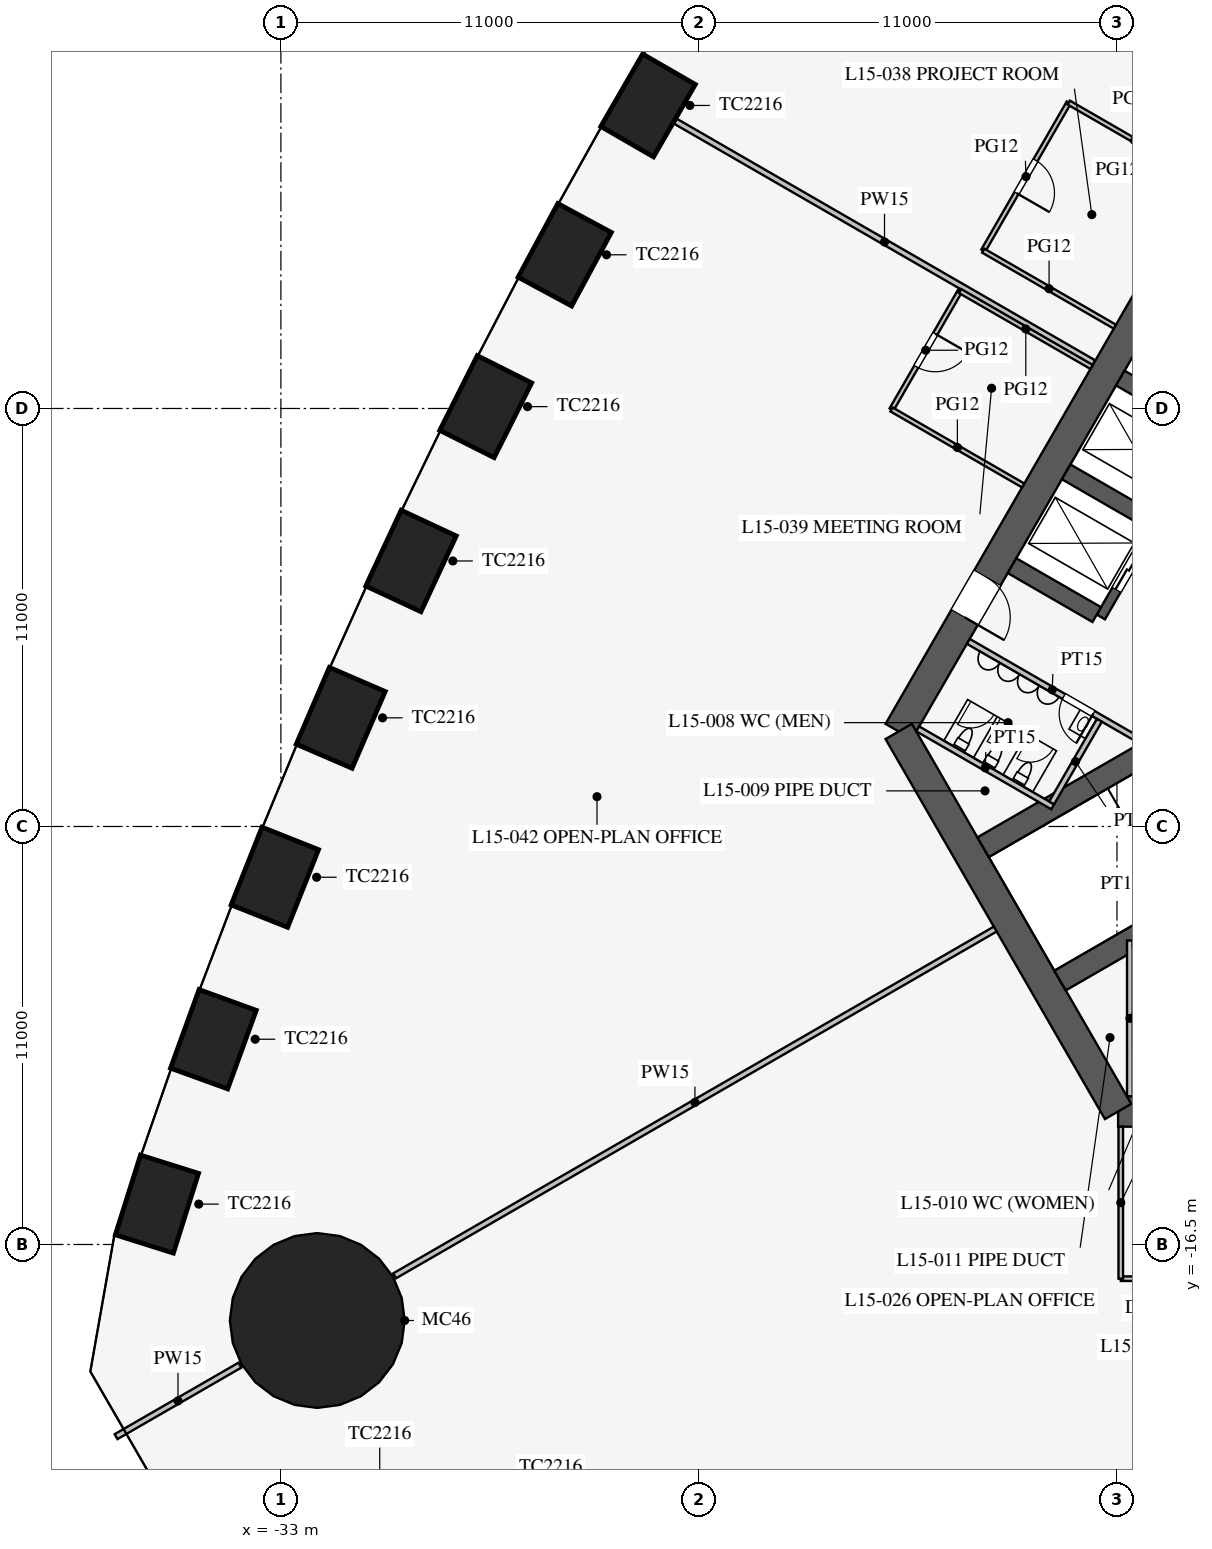
"""IFC4 building model, lengths in metres.
Left out: names, types, materials, properties, quantities, classifications, styles, units other than length and angle.
Written with IfcOpenShell. Run it as: python <this file> out.ifc"""

import sys

from ifc_helpers import new_model, si_unit, direction, frame, frame_2d, origin, origin_2d, place, context, subcontext, project, spatial, rectangle, circle, extrude, element, fill, save


model = new_model("IFC4")
c1 = context("Model", 3, precision=1e-05, world=origin(), true_north=direction((0.0, 1.0)))
c2 = subcontext(c1, "Body", "Model", "MODEL_VIEW")
j1 = project(units=[si_unit("LENGTHUNIT", "METRE"), si_unit("PLANEANGLEUNIT", "RADIAN")], contexts=[c1])
p1 = place(None, origin())
s1 = spatial("IfcSite", under=j1, at=p1, CompositionType="ELEMENT")
p2 = place(p1, origin())
s2 = spatial("IfcBuilding", under=s1, at=p2, CompositionType="ELEMENT")
p3 = place(p2, frame((0.0, 0.0, 66.9)))
s3 = spatial("IfcBuildingStorey", under=s2, at=p3, CompositionType="ELEMENT", Elevation=66.9)
for number, where, z_axis, x_axis in (
    (1, (-23.338, 13.474, 0.0), (0.0, 0.0, 1.0), (-0.5, -0.866, 0.0)),
    (2, (-25.531, 9.544, 0.0), (0.0, 0.0, 1.0), (-0.475, -0.88, 0.0)),
    (3, (-27.611, 5.549, 0.0), (0.0, 0.0, 1.0), (-0.449, -0.894, 0.0)),
    (4, (-29.576, 1.487, 0.0), (0.0, 0.0, 1.0), (-0.423, -0.906, 0.0)),
    (5, (-31.426, -2.641, 0.0), (0.0, 0.0, 1.0), (-0.396, -0.918, 0.0)),
    (6, (-33.16, -6.836, 0.0), (0.0, 0.0, 1.0), (-0.369, -0.929, 0.0)),
    (7, (-34.776, -11.099, 0.0), (0.0, 0.0, 1.0), (-0.342, -0.94, 0.0)),
    (8, (-36.262, -15.438, 0.0), (0.0, 0.0, 1.0), (-0.3, -0.954, 0.0)),
):
    element("IfcColumn", number, at=place(p3, frame(where, z_axis=z_axis, x_axis=x_axis)), inside=s3, PredefinedType="COLUMN", context=c2, shape_type="SweptSolid", body=[
        extrude(rectangle(XDim=2.2, YDim=1.6, at=origin_2d()), origin(), (0.0, 0.0, 1.0), 4.2),
    ])
p4 = place(p3, frame((-32.043, -18.5, 0.0), z_axis=(0.0, 0.0, 1.0), x_axis=(1.0, 0.0, 0.0)))
e9 = element("IfcColumn", 9, at=p4, inside=s3, PredefinedType="COLUMN", context=c2, shape_type="SweptSolid", body=[
    extrude(circle(Radius=2.3, at=origin_2d()), origin(), (0.0, 0.0, 1.0), 4.2),
])
p5 = place(p3, frame((-10.97, -13.0, 0.0), z_axis=(0.0, 0.0, 1.0), x_axis=(1.0, 0.0, 0.0)))
e10 = element("IfcWall", 10, at=p5, inside=s3, PredefinedType="SHEAR", context=c2, shape_type="SweptSolid", body=[
    extrude(rectangle(XDim=21.939, YDim=0.8, at=frame_2d((10.97, 0.0))), origin(), (0.0, 0.0, 1.0), 4.2),
])
p6 = place(p5, frame((17.27, 0.0, 0.0)))
e11 = element("IfcOpeningElement", 11, at=p6, cuts=e10, PredefinedType="OPENING", context=c2, shape_type="SweptSolid", body=[
    extrude(rectangle(XDim=1.2, YDim=2.1, at=frame_2d((0.6, 1.05))), frame((0.0, 0.41, 0.0), z_axis=(0.0, -1.0, 0.0), x_axis=(1.0, 0.0, 0.0)), (0.0, 0.0, 1.0), 0.82),
])
p7 = place(p5, frame((3.47, 0.0, 0.0)))
e12 = element("IfcOpeningElement", 12, at=p7, cuts=e10, PredefinedType="OPENING", context=c2, shape_type="SweptSolid", body=[
    extrude(rectangle(XDim=1.2, YDim=2.1, at=frame_2d((0.6, 1.05))), frame((0.0, 0.41, 0.0), z_axis=(0.0, -1.0, 0.0), x_axis=(1.0, 0.0, 0.0)), (0.0, 0.0, 1.0), 0.82),
])
p8 = place(p3, frame((-5.773, 16.0, 0.0), z_axis=(0.0, 0.0, 1.0), x_axis=(-0.500002442456, -0.866023993627, 0.0)))
e13 = element("IfcWall", 13, at=p8, inside=s3, PredefinedType="SHEAR", context=c2, shape_type="SweptSolid", body=[
    extrude(rectangle(XDim=21.939, YDim=0.8, at=frame_2d((10.97, 0.0))), origin(), (0.0, 0.0, 1.0), 4.2),
])
p9 = place(p8, frame((17.27, 0.0, 0.0)))
e14 = element("IfcOpeningElement", 14, at=p9, cuts=e13, PredefinedType="OPENING", context=c2, shape_type="SweptSolid", body=[
    extrude(rectangle(XDim=1.2, YDim=2.1, at=frame_2d((0.6, 1.05))), frame((0.0, 0.41, 0.0), z_axis=(0.0, -1.0, 0.0), x_axis=(1.0, 0.0, 0.0)), (0.0, 0.0, 1.0), 0.82),
])
p10 = place(p8, frame((3.47, 0.0, 0.0)))
e15 = element("IfcOpeningElement", 15, at=p10, cuts=e13, PredefinedType="OPENING", context=c2, shape_type="SweptSolid", body=[
    extrude(rectangle(XDim=1.2, YDim=2.1, at=frame_2d((0.6, 1.05))), frame((0.0, 0.41, 0.0), z_axis=(0.0, -1.0, 0.0), x_axis=(1.0, 0.0, 0.0)), (0.0, 0.0, 1.0), 0.82),
])
p11 = place(p3, frame((-16.743, -3.0, 0.0), z_axis=(0.0, 0.0, 1.0), x_axis=(0.499995765644, -0.866027848477, 0.0)))
e16 = element("IfcWall", 16, at=p11, inside=s3, PredefinedType="SHEAR", context=c2, shape_type="SweptSolid", body=[
    extrude(rectangle(XDim=11.547, YDim=0.8, at=frame_2d((5.773, 0.0))), origin(), (0.0, 0.0, 1.0), 4.2),
])
p12 = place(p3, frame((-5.724, 9.886, 0.0), z_axis=(0.0, 0.0, 1.0), x_axis=(-0.500001763848, -0.866024385424, 0.0)))
e17 = element("IfcWall", 17, at=p12, inside=s3, PredefinedType="SHEAR", context=c2, shape_type="SweptSolid", body=[
    extrude(rectangle(XDim=11.4, YDim=0.25, at=frame_2d((5.7, 0.0))), origin(), (0.0, 0.0, 1.0), 4.2),
])
p13 = place(p12, frame((6.525, 0.0, 0.0)))
e18 = element("IfcOpeningElement", 18, at=p13, cuts=e17, PredefinedType="OPENING", context=c2, shape_type="SweptSolid", body=[
    extrude(rectangle(XDim=1.2, YDim=2.2, at=frame_2d((0.6, 1.1))), frame((0.0, 0.135, 0.0), z_axis=(0.0, -1.0, 0.0), x_axis=(1.0, 0.0, 0.0)), (0.0, 0.0, 1.0), 0.27),
])
p14 = place(p12, frame((9.375, 0.0, 0.0)))
e19 = element("IfcOpeningElement", 19, at=p14, cuts=e17, PredefinedType="OPENING", context=c2, shape_type="SweptSolid", body=[
    extrude(rectangle(XDim=1.2, YDim=2.2, at=frame_2d((0.6, 1.1))), frame((0.0, 0.135, 0.0), z_axis=(0.0, -1.0, 0.0), x_axis=(1.0, 0.0, 0.0)), (0.0, 0.0, 1.0), 0.27),
])
for number, where, z_axis, x_axis in (
    (20, (-8.682, 5.012, 0.0), (0.0, 0.0, 1.0), (-0.866, 0.5, 0.0)),
    (21, (-10.107, 2.544, 0.0), (0.0, 0.0, 1.0), (-0.866, 0.5, 0.0)),
    (22, (-11.532, 0.076, 0.0), (0.0, 0.0, 1.0), (-0.866, 0.5, 0.0)),
):
    element("IfcWall", number, at=place(p3, frame(where, z_axis=z_axis, x_axis=x_axis)), inside=s3, PredefinedType="SHEAR", context=c2, shape_type="SweptSolid", body=[
        extrude(rectangle(XDim=2.575, YDim=0.45, at=frame_2d((1.288, 0.0))), origin(), (0.0, 0.0, 1.0), 4.2),
    ])
for number, where, z_axis, x_axis in (
    (23, (-6.663, -1.509, 0.0), (0.0, 0.0, 1.0), (-0.866, -0.5, 0.0)),
    (24, (-4.638, -5.016, 0.0), (0.0, 0.0, 1.0), (-0.866, -0.5, 0.0)),
):
    element("IfcWall", number, at=place(p3, frame(where, z_axis=z_axis, x_axis=x_axis)), inside=s3, PredefinedType="SHEAR", context=c2, shape_type="SweptSolid", body=[
        extrude(rectangle(XDim=9.075, YDim=0.6, at=frame_2d((4.538, 0.0))), origin(), (0.0, 0.0, 1.0), 4.2),
    ])
p15 = place(p3, frame((-10.495, -3.178, 0.0), z_axis=(0.0, 0.0, 1.0), x_axis=(-0.86602216432, 0.500005610874, 0.0)))
e25 = element("IfcWall", 25, at=p15, inside=s3, PredefinedType="PARTITIONING", context=c2, shape_type="SweptSolid", body=[
    extrude(rectangle(XDim=5.1, YDim=0.15, at=frame_2d((2.55, 0.0))), origin(), (0.0, 0.0, 1.0), 4.0),
])
p16 = place(p15, frame((1.3, 0.0, 0.0)))
e26 = element("IfcOpeningElement", 26, at=p16, cuts=e25, PredefinedType="OPENING", context=c2, shape_type="SweptSolid", body=[
    extrude(rectangle(XDim=0.9, YDim=2.1, at=frame_2d((0.45, 1.05))), frame((0.0, 0.085, 0.0), z_axis=(0.0, -1.0, 0.0), x_axis=(1.0, 0.0, 0.0)), (0.0, 0.0, 1.0), 0.17),
])
p17 = place(p3, frame((-12.691, -4.982, 0.0), z_axis=(0.0, 0.0, 1.0), x_axis=(-0.8660249478, 0.500000789788, 0.0)))
e27 = element("IfcWall", 27, at=p17, inside=s3, PredefinedType="PARTITIONING", context=c2, shape_type="SweptSolid", body=[
    extrude(rectangle(XDim=4.1, YDim=0.15, at=frame_2d((2.05, 0.0))), origin(), (0.0, 0.0, 1.0), 4.0),
])
p18 = place(p3, frame((-11.464, -2.706, 0.0), z_axis=(0.0, 0.0, 1.0), x_axis=(-0.50001992892, -0.866013897511, 0.0)))
e28 = element("IfcWall", 28, at=p18, inside=s3, PredefinedType="PARTITIONING", context=c2, shape_type="SweptSolid", body=[
    extrude(rectangle(XDim=2.51, YDim=0.15, at=frame_2d((1.255, 0.0))), origin(), (0.0, 0.0, 1.0), 4.0),
])
p19 = place(p3, frame((-10.66, -8.5, 0.0), z_axis=(0.0, 0.0, 1.0), x_axis=(0.0, -1.0, 0.0)))
e29 = element("IfcWall", 29, at=p19, inside=s3, PredefinedType="PARTITIONING", context=c2, shape_type="SweptSolid", body=[
    extrude(rectangle(XDim=4.1, YDim=0.15, at=frame_2d((2.05, 0.0))), origin(), (0.0, 0.0, 1.0), 4.0),
])
p20 = place(p3, frame((-14.203, -8.2, 0.0), z_axis=(0.0, 0.0, 1.0), x_axis=(-0.866024965723, -0.500000758745, 0.0)))
e30 = element("IfcWall", 30, at=p20, inside=s3, PredefinedType="PARTITIONING", context=c2, shape_type="SweptSolid", body=[
    extrude(rectangle(XDim=18.25, YDim=0.15, at=frame_2d((9.125, 0.0))), origin(), (0.0, 0.0, 1.0), 2.3),
])
p21 = place(p3, frame((-34.078, -19.675, 0.0), z_axis=(0.0, 0.0, 1.0), x_axis=(-0.866019247219, -0.500010663332, 0.0)))
e31 = element("IfcWall", 31, at=p21, inside=s3, PredefinedType="PARTITIONING", context=c2, shape_type="SweptSolid", body=[
    extrude(rectangle(XDim=3.764, YDim=0.15, at=frame_2d((1.882, 0.0))), origin(), (0.0, 0.0, 1.0), 2.3),
])
p22 = place(p3, frame((-10.9, -17.4, 0.0), z_axis=(0.0, 0.0, 1.0), x_axis=(1.0, 0.0, 0.0)))
e32 = element("IfcWall", 32, at=p22, inside=s3, PredefinedType="PARTITIONING", context=c2, shape_type="SweptSolid", body=[
    extrude(rectangle(XDim=2.4, YDim=0.12, at=frame_2d((1.2, 0.0))), origin(), (0.0, 0.0, 1.0), 2.9),
])
p23 = place(p22, frame((0.75, 0.0, 0.15)))
e33 = element("IfcOpeningElement", 33, at=p23, cuts=e32, PredefinedType="OPENING", context=c2, shape_type="SweptSolid", body=[
    extrude(rectangle(XDim=0.9, YDim=2.1, at=frame_2d((0.45, 1.05))), frame((0.0, 0.07, 0.0), z_axis=(0.0, -1.0, 0.0), x_axis=(1.0, 0.0, 0.0)), (0.0, 0.0, 1.0), 0.14),
])
p24 = place(p3, frame((-10.9, -13.4, 0.0), z_axis=(0.0, 0.0, 1.0), x_axis=(0.0, -1.0, 0.0)))
e34 = element("IfcWall", 34, at=p24, inside=s3, PredefinedType="PARTITIONING", context=c2, shape_type="SweptSolid", body=[
    extrude(rectangle(XDim=4.0, YDim=0.12, at=frame_2d((2.0, 0.0))), origin(), (0.0, 0.0, 1.0), 2.9),
])
p25 = place(p3, frame((-11.613, 6.705, 0.0), z_axis=(0.0, 0.0, 1.0), x_axis=(-0.866029791586, 0.499992400027, 0.0)))
e35 = element("IfcWall", 35, at=p25, inside=s3, PredefinedType="PARTITIONING", context=c2, shape_type="SweptSolid", body=[
    extrude(rectangle(XDim=12.709, YDim=0.15, at=frame_2d((6.354, 0.0))), origin(), (0.0, 0.0, 1.0), 2.8),
])
p26 = place(p3, frame((-15.131, 8.592, 0.0), z_axis=(0.0, 0.0, 1.0), x_axis=(-0.500012057535, -0.866018442252, 0.0)))
e36 = element("IfcWall", 36, at=p26, inside=s3, PredefinedType="PARTITIONING", context=c2, shape_type="SweptSolid", body=[
    extrude(rectangle(XDim=3.6, YDim=0.12, at=frame_2d((1.8, 0.0))), origin(), (0.0, 0.0, 1.0), 2.9),
])
p27 = place(p26, frame((1.3, 0.0, 0.15)))
e37 = element("IfcOpeningElement", 37, at=p27, cuts=e36, PredefinedType="OPENING", context=c2, shape_type="SweptSolid", body=[
    extrude(rectangle(XDim=1.0, YDim=2.1, at=frame_2d((0.5, 1.05))), frame((0.0, 0.07, 0.0), z_axis=(0.0, -1.0, 0.0), x_axis=(1.0, 0.0, 0.0)), (0.0, 0.0, 1.0), 0.14),
])
p28 = place(p3, frame((-12.269, 13.55, 0.0), z_axis=(0.0, 0.0, 1.0), x_axis=(-0.499990139034, -0.866031096941, 0.0)))
e38 = element("IfcWall", 38, at=p28, inside=s3, PredefinedType="PARTITIONING", context=c2, shape_type="SweptSolid", body=[
    extrude(rectangle(XDim=4.5, YDim=0.12, at=frame_2d((2.25, 0.0))), origin(), (0.0, 0.0, 1.0), 2.9),
])
p29 = place(p28, frame((1.75, 0.0, 0.15)))
e39 = element("IfcOpeningElement", 39, at=p29, cuts=e38, PredefinedType="OPENING", context=c2, shape_type="SweptSolid", body=[
    extrude(rectangle(XDim=1.0, YDim=2.1, at=frame_2d((0.5, 1.05))), frame((0.0, 0.07, 0.0), z_axis=(0.0, -1.0, 0.0), x_axis=(1.0, 0.0, 0.0)), (0.0, 0.0, 1.0), 0.14),
])
p30 = place(p3, frame((-11.667, 6.592, 0.0), z_axis=(0.0, 0.0, 1.0), x_axis=(-0.866026010844, 0.49999894854, 0.0)))
e40 = element("IfcWall", 40, at=p30, inside=s3, PredefinedType="PARTITIONING", context=c2, shape_type="SweptSolid", body=[
    extrude(rectangle(XDim=4.0, YDim=0.12, at=frame_2d((2.0, 0.0))), origin(), (0.0, 0.0, 1.0), 2.8),
])
for number, where, z_axis, x_axis in (
    (41, (-13.467, 3.474, 0.0), (0.0, 0.0, 1.0), (-0.866, 0.5, 0.0)),
    (42, (-11.055, 7.653, 0.0), (0.0, 0.0, 1.0), (-0.866, 0.5, 0.0)),
    (43, (-8.805, 11.55, 0.0), (0.0, 0.0, 1.0), (-0.866, 0.5, 0.0)),
    (44, (-7.355, 14.061, 0.0), (0.0, 0.0, 1.0), (-0.866, 0.5, 0.0)),
):
    element("IfcWall", number, at=place(p3, frame(where, z_axis=z_axis, x_axis=x_axis)), inside=s3, PredefinedType="PARTITIONING", context=c2, shape_type="SweptSolid", body=[
        extrude(rectangle(XDim=4.0, YDim=0.12, at=frame_2d((2.0, 0.0))), origin(), (0.0, 0.0, 1.0), 2.9),
    ])
p31 = place(p16, origin())
e45 = element("IfcDoor", 45, at=p31, inside=s3, OperationType="SINGLE_SWING_LEFT", PredefinedType="DOOR", context=c2, shape_type="SweptSolid", body=[
    extrude(rectangle(XDim=0.9, YDim=2.1, at=frame_2d((0.45, 1.05))), frame((0.0, 0.025, 0.0), z_axis=(0.0, -1.0, 0.0), x_axis=(1.0, 0.0, 0.0)), (0.0, 0.0, 1.0), 0.05),
])
fill(e26, e45)
p32 = place(p9, origin())
e46 = element("IfcDoor", 46, at=p32, inside=s3, OperationType="SINGLE_SWING_RIGHT", PredefinedType="DOOR", context=c2, shape_type="SweptSolid", body=[
    extrude(rectangle(XDim=1.2, YDim=2.1, at=frame_2d((0.6, 1.05))), frame((0.0, 0.025, 0.0), z_axis=(0.0, -1.0, 0.0), x_axis=(1.0, 0.0, 0.0)), (0.0, 0.0, 1.0), 0.05),
])
fill(e14, e46)
p33 = place(p29, origin())
e47 = element("IfcDoor", 47, at=p33, inside=s3, OperationType="SINGLE_SWING_RIGHT", PredefinedType="DOOR", context=c2, shape_type="SweptSolid", body=[
    extrude(rectangle(XDim=1.0, YDim=2.1, at=frame_2d((0.5, 1.05))), frame((0.0, 0.025, 0.0), z_axis=(0.0, -1.0, 0.0), x_axis=(1.0, 0.0, 0.0)), (0.0, 0.0, 1.0), 0.05),
])
fill(e39, e47)
p34 = place(p27, origin())
e48 = element("IfcDoor", 48, at=p34, inside=s3, OperationType="SINGLE_SWING_LEFT", PredefinedType="DOOR", context=c2, shape_type="SweptSolid", body=[
    extrude(rectangle(XDim=1.0, YDim=2.1, at=frame_2d((0.5, 1.05))), frame((0.0, 0.025, 0.0), z_axis=(0.0, -1.0, 0.0), x_axis=(1.0, 0.0, 0.0)), (0.0, 0.0, 1.0), 0.05),
])
fill(e37, e48)
p35 = place(p14, origin())
e49 = element("IfcDoor", 49, at=p35, inside=s3, OperationType="DOUBLE_DOOR_SLIDING", PredefinedType="DOOR", context=c2, shape_type="SweptSolid", body=[
    extrude(rectangle(XDim=1.2, YDim=2.2, at=frame_2d((0.6, 1.1))), frame((0.0, 0.025, 0.0), z_axis=(0.0, -1.0, 0.0), x_axis=(1.0, 0.0, 0.0)), (0.0, 0.0, 1.0), 0.05),
])
fill(e19, e49)
save(model, sys.argv[1])
